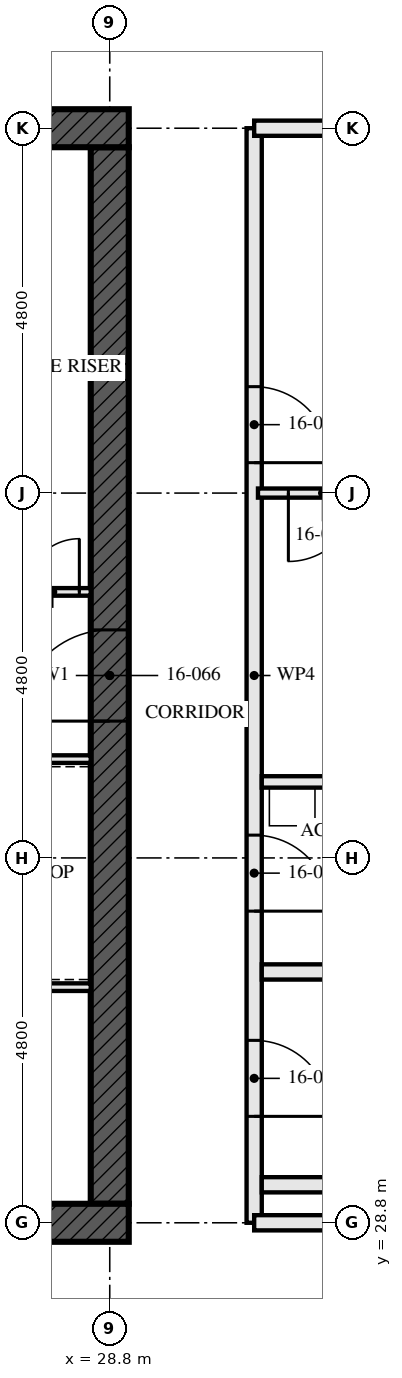
"""IFC4 building model, lengths in metres.
Left out: names, types, materials, properties, quantities, classifications, styles, units other than length and angle.
Written with IfcOpenShell. Run it as: python <this file> out.ifc"""

import sys

from ifc_helpers import new_model, si_unit, direction, frame, frame_2d, origin, place, context, subcontext, project, spatial, rectangle, extrude, element, fill, save


model = new_model("IFC4")
c1 = context("Model", 3, precision=1e-05, world=origin(), true_north=direction((0.0, 1.0)))
c2 = subcontext(c1, "Body", "Model", "MODEL_VIEW")
j1 = project(units=[si_unit("LENGTHUNIT", "METRE"), si_unit("PLANEANGLEUNIT", "RADIAN")], contexts=[c1])
p1 = place(None, origin())
s1 = spatial("IfcSite", under=j1, at=p1, CompositionType="ELEMENT")
p2 = place(p1, origin())
s2 = spatial("IfcBuilding", under=s1, at=p2, CompositionType="ELEMENT")
p3 = place(p2, frame((0.0, 0.0, 62.0)))
s3 = spatial("IfcBuildingStorey", under=s2, at=p3, CompositionType="ELEMENT", Elevation=62.0)
p4 = place(p3, frame((14.15, 28.8, -0.17), z_axis=(0.0, 0.0, 1.0), x_axis=(1.0, 0.0, 0.0)))
e1 = element("IfcWall", 1, at=p4, inside=s3, PredefinedType="SHEAR", context=c2, shape_type="SweptSolid", body=[
    extrude(rectangle(XDim=14.9, YDim=0.5, at=frame_2d((7.45, 0.0))), origin(), (0.0, 0.0, 1.0), 3.5),
])
p5 = place(p4, frame((6.85, 0.0, 0.17)))
e2 = element("IfcOpeningElement", 2, at=p5, cuts=e1, PredefinedType="OPENING", context=c2, shape_type="SweptSolid", body=[
    extrude(rectangle(XDim=1.2, YDim=2.1, at=frame_2d((0.6, 1.05))), frame((0.0, 0.26, 0.0), z_axis=(0.0, -1.0, 0.0), x_axis=(1.0, 0.0, 0.0)), (0.0, 0.0, 1.0), 0.521),
])
p6 = place(p3, frame((29.05, 43.2, -0.17), z_axis=(0.0, 0.0, 1.0), x_axis=(-1.0, 0.0, 0.0)))
e3 = element("IfcWall", 3, at=p6, inside=s3, PredefinedType="SHEAR", context=c2, shape_type="SweptSolid", body=[
    extrude(rectangle(XDim=14.9, YDim=0.5, at=frame_2d((7.45, 0.0))), origin(), (0.0, 0.0, 1.0), 3.5),
])
p7 = place(p6, frame((6.85, 0.0, 0.17)))
e4 = element("IfcOpeningElement", 4, at=p7, cuts=e3, PredefinedType="OPENING", context=c2, shape_type="SweptSolid", body=[
    extrude(rectangle(XDim=1.2, YDim=2.1, at=frame_2d((0.6, 1.05))), frame((0.0, 0.26, 0.0), z_axis=(0.0, -1.0, 0.0), x_axis=(1.0, 0.0, 0.0)), (0.0, 0.0, 1.0), 0.521),
])
p8 = place(p3, frame((28.8, 29.05, -0.17), z_axis=(0.0, 0.0, 1.0), x_axis=(0.0, 1.0, 0.0)))
e5 = element("IfcWall", 5, at=p8, inside=s3, PredefinedType="SHEAR", context=c2, shape_type="SweptSolid", body=[
    extrude(rectangle(XDim=13.9, YDim=0.5, at=frame_2d((6.95, 0.0))), origin(), (0.0, 0.0, 1.0), 3.5),
])
p9 = place(p8, frame((6.35, 0.0, 0.17)))
e6 = element("IfcOpeningElement", 6, at=p9, cuts=e5, PredefinedType="OPENING", context=c2, shape_type="SweptSolid", body=[
    extrude(rectangle(XDim=1.2, YDim=2.1, at=frame_2d((0.6, 1.05))), frame((0.0, 0.26, 0.0), z_axis=(0.0, -1.0, 0.0), x_axis=(1.0, 0.0, 0.0)), (0.0, 0.0, 1.0), 0.521),
])
for number, where, z_axis, x_axis in (
    (7, (35.5, 29.3, 0.0), (0.0, 0.0, 1.0), (-1.0, 0.0, 0.0)),
    (8, (35.5, 32.1, 0.0), (0.0, 0.0, 1.0), (-1.0, 0.0, 0.0)),
):
    element("IfcWall", number, at=place(p3, frame(where, z_axis=z_axis, x_axis=x_axis)), inside=s3, PredefinedType="SOLIDWALL", context=c2, shape_type="SweptSolid", body=[
        extrude(rectangle(XDim=4.7, YDim=0.2, at=frame_2d((2.35, 0.0))), origin(), (0.0, 0.0, 1.0), 2.99),
    ])
p10 = place(p3, frame((33.8, 34.6, 0.0), z_axis=(0.0, 0.0, 1.0), x_axis=(-1.0, 0.0, 0.0)))
e9 = element("IfcWall", 9, at=p10, inside=s3, PredefinedType="PARTITIONING", context=c2, shape_type="SweptSolid", body=[
    extrude(rectangle(XDim=3.0, YDim=0.15, at=frame_2d((1.5, 0.0))), origin(), (0.0, 0.0, 1.0), 3.33),
])
p11 = place(p3, frame((35.4, 38.4, 0.0), z_axis=(0.0, 0.0, 1.0), x_axis=(-1.0, 0.0, 0.0)))
e10 = element("IfcWall", 10, at=p11, inside=s3, PredefinedType="PARTITIONING", context=c2, shape_type="SweptSolid", body=[
    extrude(rectangle(XDim=4.65, YDim=0.12, at=frame_2d((2.325, 0.0))), origin(), (0.0, 0.0, 1.0), 2.55),
])
p12 = place(p11, frame((3.35, 0.0, 0.0)))
e11 = element("IfcOpeningElement", 11, at=p12, cuts=e10, PredefinedType="OPENING", context=c2, shape_type="SweptSolid", body=[
    extrude(rectangle(XDim=0.9, YDim=2.1, at=frame_2d((0.45, 1.05))), frame((0.0, 0.071, 0.0), z_axis=(0.0, -1.0, 0.0), x_axis=(1.0, 0.0, 0.0)), (0.0, 0.0, 1.0), 0.141),
])
p13 = place(p3, frame((30.7, 28.8, 0.0), z_axis=(0.0, 0.0, 1.0), x_axis=(0.0, 1.0, 0.0)))
e12 = element("IfcWall", 12, at=p13, inside=s3, PredefinedType="PARTITIONING", context=c2, shape_type="SweptSolid", body=[
    extrude(rectangle(XDim=14.4, YDim=0.2, at=frame_2d((7.2, 0.0))), origin(), (0.0, 0.0, 1.0), 2.55),
])
p14 = place(p13, frame((1.4, 0.0, 0.0)))
e13 = element("IfcOpeningElement", 13, at=p14, cuts=e12, PredefinedType="OPENING", context=c2, shape_type="SweptSolid", body=[
    extrude(rectangle(XDim=1.0, YDim=2.1, at=frame_2d((0.5, 1.05))), frame((0.0, 0.111, 0.0), z_axis=(0.0, -1.0, 0.0), x_axis=(1.0, 0.0, 0.0)), (0.0, 0.0, 1.0), 0.221),
])
p15 = place(p13, frame((4.1, 0.0, 0.0)))
e14 = element("IfcOpeningElement", 14, at=p15, cuts=e12, PredefinedType="OPENING", context=c2, shape_type="SweptSolid", body=[
    extrude(rectangle(XDim=1.0, YDim=2.1, at=frame_2d((0.5, 1.05))), frame((0.0, 0.111, 0.0), z_axis=(0.0, -1.0, 0.0), x_axis=(1.0, 0.0, 0.0)), (0.0, 0.0, 1.0), 0.221),
])
p16 = place(p13, frame((10.0, 0.0, 0.0)))
e15 = element("IfcOpeningElement", 15, at=p16, cuts=e12, PredefinedType="OPENING", context=c2, shape_type="SweptSolid", body=[
    extrude(rectangle(XDim=1.0, YDim=2.1, at=frame_2d((0.5, 1.05))), frame((0.0, 0.111, 0.0), z_axis=(0.0, -1.0, 0.0), x_axis=(1.0, 0.0, 0.0)), (0.0, 0.0, 1.0), 0.221),
])
p17 = place(p3, frame((23.05, 34.9, 0.0), z_axis=(0.0, 0.0, 1.0), x_axis=(1.0, 0.0, 0.0)))
e16 = element("IfcWall", 16, at=p17, inside=s3, PredefinedType="SOLIDWALL", context=c2, shape_type="SweptSolid", body=[
    extrude(rectangle(XDim=5.5, YDim=0.1, at=frame_2d((2.75, 0.0))), origin(), (0.0, 0.0, 1.0), 3.33),
])
p18 = place(p3, frame((22.65, 37.1, 0.0), z_axis=(0.0, 0.0, 1.0), x_axis=(1.0, 0.0, 0.0)))
e17 = element("IfcWall", 17, at=p18, inside=s3, PredefinedType="SOLIDWALL", context=c2, shape_type="SweptSolid", body=[
    extrude(rectangle(XDim=5.9, YDim=0.1, at=frame_2d((2.95, 0.0))), origin(), (0.0, 0.0, 1.0), 3.33),
])
p19 = place(p18, frame((3.5, 0.0, 0.0)))
e18 = element("IfcOpeningElement", 18, at=p19, cuts=e17, PredefinedType="OPENING", context=c2, shape_type="SweptSolid", body=[
    extrude(rectangle(XDim=0.9, YDim=2.1, at=frame_2d((0.45, 1.05))), frame((0.0, 0.061, 0.0), z_axis=(0.0, -1.0, 0.0), x_axis=(1.0, 0.0, 0.0)), (0.0, 0.0, 1.0), 0.121),
])
p20 = place(p18, frame((5.05, 0.0, 0.0)))
e19 = element("IfcOpeningElement", 19, at=p20, cuts=e17, PredefinedType="OPENING", context=c2, shape_type="SweptSolid", body=[
    extrude(rectangle(XDim=0.7, YDim=2.1, at=frame_2d((0.35, 1.05))), frame((0.0, 0.061, 0.0), z_axis=(0.0, -1.0, 0.0), x_axis=(1.0, 0.0, 0.0)), (0.0, 0.0, 1.0), 0.121),
])
p21 = place(p3, frame((23.15, 31.9, 0.0), z_axis=(0.0, 0.0, 1.0), x_axis=(1.0, 0.0, 0.0)))
e20 = element("IfcWall", 20, at=p21, inside=s3, PredefinedType="SOLIDWALL", context=c2, shape_type="SweptSolid", body=[
    extrude(rectangle(XDim=5.4, YDim=0.1, at=frame_2d((2.7, 0.0))), origin(), (0.0, 0.0, 1.0), 3.33),
])
for number, where, z_axis, x_axis in (
    (21, (33.205, 28.8, 0.0), (0.0, 0.0, 1.0), (-1.0, 0.0, 0.0)),
    (22, (33.205, 43.2, 0.0), (0.0, 0.0, 1.0), (-1.0, 0.0, 0.0)),
):
    element("IfcWall", number, at=place(p3, frame(where, z_axis=z_axis, x_axis=x_axis)), inside=s3, PredefinedType="PARTITIONING", context=c2, shape_type="SweptSolid", body=[
        extrude(rectangle(XDim=2.505, YDim=0.2, at=frame_2d((1.252, 0.0))), origin(), (0.0, 0.0, 1.0), 2.32),
    ])
p22 = place(p12, origin())
e23 = element("IfcDoor", 23, at=p22, inside=s3, OperationType="SINGLE_SWING_LEFT", PredefinedType="DOOR", context=c2, shape_type="SweptSolid", body=[
    extrude(rectangle(XDim=0.9, YDim=2.1, at=frame_2d((0.45, 1.05))), frame((0.0, 0.022, 0.0), z_axis=(0.0, -1.0, 0.0), x_axis=(1.0, 0.0, 0.0)), (0.0, 0.0, 1.0), 0.044),
])
fill(e11, e23)
p23 = place(p14, frame((1.0, 0.0, 0.0), z_axis=(0.0, 0.0, 1.0), x_axis=(-1.0, 0.0, 0.0)))
e24 = element("IfcDoor", 24, at=p23, inside=s3, OperationType="SINGLE_SWING_LEFT", PredefinedType="DOOR", context=c2, shape_type="SweptSolid", body=[
    extrude(rectangle(XDim=1.0, YDim=2.1, at=frame_2d((0.5, 1.05))), frame((0.0, 0.032, 0.0), z_axis=(0.0, -1.0, 0.0), x_axis=(1.0, 0.0, 0.0)), (0.0, 0.0, 1.0), 0.064),
])
fill(e13, e24)
p24 = place(p15, frame((1.0, 0.0, 0.0), z_axis=(0.0, 0.0, 1.0), x_axis=(-1.0, 0.0, 0.0)))
e25 = element("IfcDoor", 25, at=p24, inside=s3, OperationType="SINGLE_SWING_LEFT", PredefinedType="DOOR", context=c2, shape_type="SweptSolid", body=[
    extrude(rectangle(XDim=1.0, YDim=2.1, at=frame_2d((0.5, 1.05))), frame((0.0, 0.027, 0.0), z_axis=(0.0, -1.0, 0.0), x_axis=(1.0, 0.0, 0.0)), (0.0, 0.0, 1.0), 0.054),
])
fill(e14, e25)
p25 = place(p16, frame((1.0, 0.0, 0.0), z_axis=(0.0, 0.0, 1.0), x_axis=(-1.0, 0.0, 0.0)))
e26 = element("IfcDoor", 26, at=p25, inside=s3, OperationType="SINGLE_SWING_LEFT", PredefinedType="DOOR", context=c2, shape_type="SweptSolid", body=[
    extrude(rectangle(XDim=1.0, YDim=2.1, at=frame_2d((0.5, 1.05))), frame((0.0, 0.027, 0.0), z_axis=(0.0, -1.0, 0.0), x_axis=(1.0, 0.0, 0.0)), (0.0, 0.0, 1.0), 0.054),
])
fill(e15, e26)
p26 = place(p20, origin())
e27 = element("IfcDoor", 27, at=p26, inside=s3, OperationType="SINGLE_SWING_LEFT", PredefinedType="DOOR", context=c2, shape_type="SweptSolid", body=[
    extrude(rectangle(XDim=0.7, YDim=2.1, at=frame_2d((0.35, 1.05))), frame((0.0, 0.027, 0.0), z_axis=(0.0, -1.0, 0.0), x_axis=(1.0, 0.0, 0.0)), (0.0, 0.0, 1.0), 0.054),
])
fill(e19, e27)
p27 = place(p9, origin())
e28 = element("IfcDoor", 28, at=p27, inside=s3, OperationType="SINGLE_SWING_LEFT", PredefinedType="DOOR", context=c2, shape_type="SweptSolid", body=[
    extrude(rectangle(XDim=1.2, YDim=2.1, at=frame_2d((0.6, 1.05))), frame((0.0, 0.027, 0.0), z_axis=(0.0, -1.0, 0.0), x_axis=(1.0, 0.0, 0.0)), (0.0, 0.0, 1.0), 0.054),
])
fill(e6, e28)
save(model, sys.argv[1])
